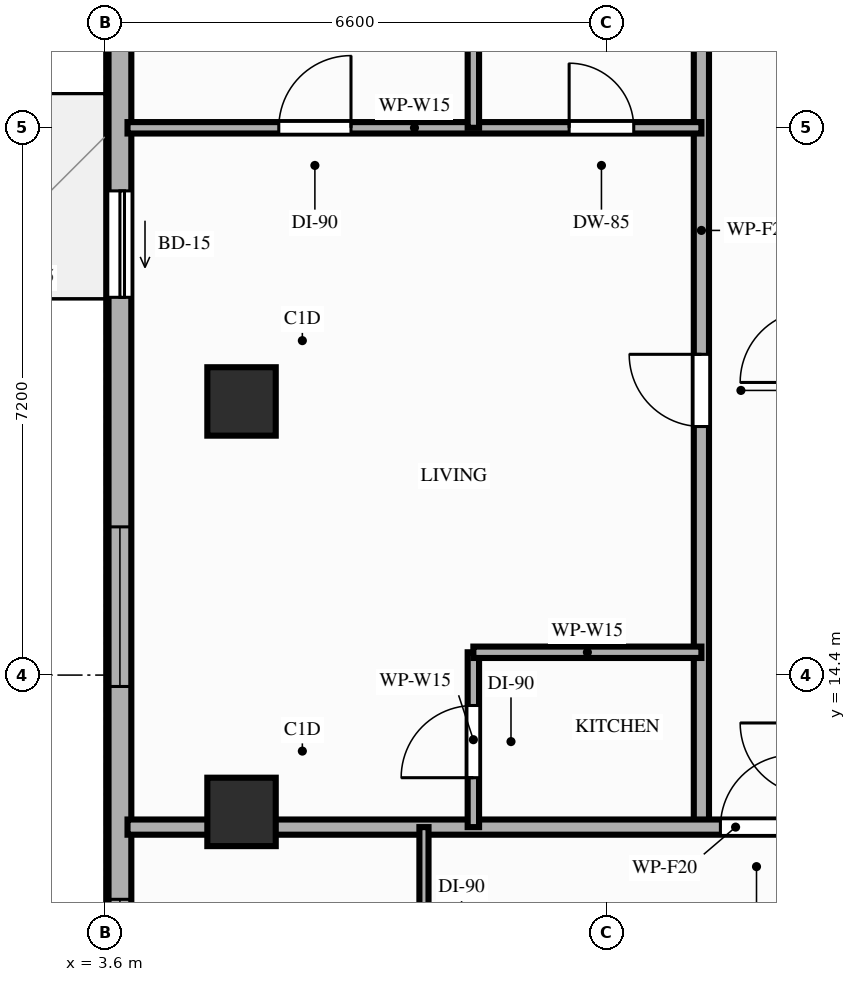
"""IFC4 building model, lengths in metres.
Left out: names, types, materials, properties, quantities, classifications, styles, units other than length and angle.
Written with IfcOpenShell. Run it as: python <this file> out.ifc"""

import sys

from ifc_helpers import new_model, si_unit, direction, frame, frame_2d, origin, origin_2d, place, context, subcontext, project, spatial, rectangle, extrude, element, fill, save


model = new_model("IFC4")
c1 = context("Model", 3, precision=1e-05, world=origin(), true_north=direction((0.0, 1.0)))
c2 = subcontext(c1, "Body", "Model", "MODEL_VIEW")
j1 = project(units=[si_unit("LENGTHUNIT", "METRE"), si_unit("PLANEANGLEUNIT", "RADIAN")], contexts=[c1])
p1 = place(None, origin())
s1 = spatial("IfcSite", under=j1, at=p1, CompositionType="ELEMENT")
p2 = place(p1, origin())
s2 = spatial("IfcBuilding", under=s1, at=p2, CompositionType="ELEMENT")
p3 = place(p2, frame((0.0, 0.0, 185.6)))
s3 = spatial("IfcBuildingStorey", under=s2, at=p3, CompositionType="ELEMENT", Elevation=185.6)
for number, where, z_axis, x_axis in (
    (1, (5.4, 12.6, 0.0), (0.0, 0.0, 1.0), (1.0, 0.0, 0.0)),
    (2, (5.4, 18.0, 0.0), (0.0, 0.0, 1.0), (1.0, 0.0, 0.0)),
):
    element("IfcColumn", number, at=place(p3, frame(where, z_axis=z_axis, x_axis=x_axis)), inside=s3, PredefinedType="COLUMN", context=c2, shape_type="SweptSolid", body=[
        extrude(rectangle(XDim=0.9, YDim=0.9, at=origin_2d()), origin(), (0.0, 0.0, 1.0), 3.2),
    ])
p4 = place(p3, frame((3.8, 42.1, 0.0), z_axis=(0.0, 0.0, 1.0), x_axis=(0.0, -1.0, 0.0)))
e3 = element("IfcWall", 3, at=p4, inside=s3, PredefinedType="STANDARD", context=c2, shape_type="SweptSolid", body=[
    extrude(rectangle(XDim=33.3, YDim=0.3, at=frame_2d((16.65, 0.0))), origin(), (0.0, 0.0, 1.0), 2.71),
])
p5 = place(p4, frame((21.33, 0.0, 0.0)))
e4 = element("IfcOpeningElement", 4, at=p5, cuts=e3, PredefinedType="OPENING", context=c2, shape_type="SweptSolid", body=[
    extrude(rectangle(XDim=1.4, YDim=2.1, at=frame_2d((0.7, 1.05))), frame((0.0, 0.16, 0.0), z_axis=(0.0, -1.0, 0.0), x_axis=(1.0, 0.0, 0.0)), (0.0, 0.0, 1.0), 0.32),
])
p6 = place(p4, frame((16.2, 0.0, 0.85)))
e5 = element("IfcOpeningElement", 5, at=p6, cuts=e3, PredefinedType="OPENING", context=c2, shape_type="SweptSolid", body=[
    extrude(rectangle(XDim=2.1, YDim=1.61, at=frame_2d((1.05, 0.805))), frame((0.0, 0.16, 0.0), z_axis=(0.0, -1.0, 0.0), x_axis=(1.0, 0.0, 0.0)), (0.0, 0.0, 1.0), 0.32),
])
p7 = place(p4, frame((30.65, 0.0, 0.85)))
e6 = element("IfcOpeningElement", 6, at=p7, cuts=e3, PredefinedType="OPENING", context=c2, shape_type="SweptSolid", body=[
    extrude(rectangle(XDim=2.1, YDim=1.61, at=frame_2d((1.05, 0.805))), frame((0.0, 0.16, 0.0), z_axis=(0.0, -1.0, 0.0), x_axis=(1.0, 0.0, 0.0)), (0.0, 0.0, 1.0), 0.32),
])
p8 = place(p4, frame((25.75, 0.0, 0.85)))
e7 = element("IfcOpeningElement", 7, at=p8, cuts=e3, PredefinedType="OPENING", context=c2, shape_type="SweptSolid", body=[
    extrude(rectangle(XDim=2.1, YDim=1.61, at=frame_2d((1.05, 0.805))), frame((0.0, 0.16, 0.0), z_axis=(0.0, -1.0, 0.0), x_axis=(1.0, 0.0, 0.0)), (0.0, 0.0, 1.0), 0.32),
])
p9 = place(p4, frame((9.75, 0.0, 0.85)))
e8 = element("IfcOpeningElement", 8, at=p9, cuts=e3, PredefinedType="OPENING", context=c2, shape_type="SweptSolid", body=[
    extrude(rectangle(XDim=2.1, YDim=1.61, at=frame_2d((1.05, 0.805))), frame((0.0, 0.16, 0.0), z_axis=(0.0, -1.0, 0.0), x_axis=(1.0, 0.0, 0.0)), (0.0, 0.0, 1.0), 0.32),
])
p10 = place(p4, frame((3.65, 0.0, 0.85)))
e9 = element("IfcOpeningElement", 9, at=p10, cuts=e3, PredefinedType="OPENING", context=c2, shape_type="SweptSolid", body=[
    extrude(rectangle(XDim=2.1, YDim=1.61, at=frame_2d((1.05, 0.805))), frame((0.0, 0.16, 0.0), z_axis=(0.0, -1.0, 0.0), x_axis=(1.0, 0.0, 0.0)), (0.0, 0.0, 1.0), 0.32),
])
p11 = place(p3, frame((11.45, 12.4, 0.0), z_axis=(0.0, 0.0, 1.0), x_axis=(0.0, 1.0, 0.0)))
e10 = element("IfcWall", 10, at=p11, inside=s3, PredefinedType="PARTITIONING", context=c2, shape_type="SweptSolid", body=[
    extrude(rectangle(XDim=15.7, YDim=0.2, at=frame_2d((7.85, 0.0))), origin(), (0.0, 0.0, 1.0), 2.45),
])
p12 = place(p11, frame((5.27, 0.0, 0.0)))
e11 = element("IfcOpeningElement", 11, at=p12, cuts=e10, PredefinedType="OPENING", context=c2, shape_type="SweptSolid", body=[
    extrude(rectangle(XDim=0.95, YDim=2.15, at=frame_2d((0.475, 1.075))), frame((0.0, 0.11, 0.0), z_axis=(0.0, -1.0, 0.0), x_axis=(1.0, 0.0, 0.0)), (0.0, 0.0, 1.0), 0.22),
])
p13 = place(p3, frame((3.9, 12.4, 0.0), z_axis=(0.0, 0.0, 1.0), x_axis=(1.0, 0.0, 0.0)))
e12 = element("IfcWall", 12, at=p13, inside=s3, PredefinedType="PARTITIONING", context=c2, shape_type="SweptSolid", body=[
    extrude(rectangle(XDim=16.0, YDim=0.2, at=frame_2d((8.0, 0.0))), origin(), (0.0, 0.0, 1.0), 2.45),
])
p14 = place(p13, frame((7.8, 0.0, 0.0)))
e13 = element("IfcOpeningElement", 13, at=p14, cuts=e12, PredefinedType="OPENING", context=c2, shape_type="SweptSolid", body=[
    extrude(rectangle(XDim=0.95, YDim=2.15, at=frame_2d((0.475, 1.075))), frame((0.0, 0.11, 0.0), z_axis=(0.0, -1.0, 0.0), x_axis=(1.0, 0.0, 0.0)), (0.0, 0.0, 1.0), 0.22),
])
p15 = place(p3, frame((7.8, 8.7, 0.0), z_axis=(0.0, 0.0, 1.0), x_axis=(0.0, 1.0, 0.0)))
e14 = element("IfcWall", 14, at=p15, inside=s3, PredefinedType="PARTITIONING", context=c2, shape_type="SweptSolid", body=[
    extrude(rectangle(XDim=3.7, YDim=0.12, at=frame_2d((1.85, 0.0))), origin(), (0.0, 0.0, 1.0), 2.45),
])
p16 = place(p15, frame((1.67, 0.0, 0.0)))
e15 = element("IfcOpeningElement", 15, at=p16, cuts=e14, PredefinedType="OPENING", context=c2, shape_type="SweptSolid", body=[
    extrude(rectangle(XDim=0.95, YDim=2.15, at=frame_2d((0.475, 1.075))), frame((0.0, 0.07, 0.0), z_axis=(0.0, -1.0, 0.0), x_axis=(1.0, 0.0, 0.0)), (0.0, 0.0, 1.0), 0.14),
])
p17 = place(p3, frame((3.9, 21.6, 0.0), z_axis=(0.0, 0.0, 1.0), x_axis=(1.0, 0.0, 0.0)))
e16 = element("IfcWall", 16, at=p17, inside=s3, PredefinedType="PARTITIONING", context=c2, shape_type="SweptSolid", body=[
    extrude(rectangle(XDim=7.55, YDim=0.15, at=frame_2d((3.775, 0.0))), origin(), (0.0, 0.0, 1.0), 2.45),
])
p18 = place(p17, frame((1.99, 0.0, 0.0)))
e17 = element("IfcOpeningElement", 17, at=p18, cuts=e16, PredefinedType="OPENING", context=c2, shape_type="SweptSolid", body=[
    extrude(rectangle(XDim=0.95, YDim=2.15, at=frame_2d((0.475, 1.075))), frame((0.0, 0.085, 0.0), z_axis=(0.0, -1.0, 0.0), x_axis=(1.0, 0.0, 0.0)), (0.0, 0.0, 1.0), 0.17),
])
p19 = place(p17, frame((5.81, 0.0, 0.0)))
e18 = element("IfcOpeningElement", 18, at=p19, cuts=e16, PredefinedType="OPENING", context=c2, shape_type="SweptSolid", body=[
    extrude(rectangle(XDim=0.85, YDim=2.1, at=frame_2d((0.425, 1.05))), frame((0.0, 0.085, 0.0), z_axis=(0.0, -1.0, 0.0), x_axis=(1.0, 0.0, 0.0)), (0.0, 0.0, 1.0), 0.17),
])
p20 = place(p3, frame((8.45, 21.6, 0.0), z_axis=(0.0, 0.0, 1.0), x_axis=(0.0, 1.0, 0.0)))
e19 = element("IfcWall", 19, at=p20, inside=s3, PredefinedType="PARTITIONING", context=c2, shape_type="SweptSolid", body=[
    extrude(rectangle(XDim=6.5, YDim=0.15, at=frame_2d((3.25, 0.0))), origin(), (0.0, 0.0, 1.0), 2.45),
])
p21 = place(p3, frame((8.45, 12.4, 0.0), z_axis=(0.0, 0.0, 1.0), x_axis=(0.0, 1.0, 0.0)))
e20 = element("IfcWall", 20, at=p21, inside=s3, PredefinedType="PARTITIONING", context=c2, shape_type="SweptSolid", body=[
    extrude(rectangle(XDim=2.3, YDim=0.15, at=frame_2d((1.15, 0.0))), origin(), (0.0, 0.0, 1.0), 2.45),
])
p22 = place(p21, frame((0.65, 0.0, 0.0)))
e21 = element("IfcOpeningElement", 21, at=p22, cuts=e20, PredefinedType="OPENING", context=c2, shape_type="SweptSolid", body=[
    extrude(rectangle(XDim=0.95, YDim=2.15, at=frame_2d((0.475, 1.075))), frame((0.0, 0.085, 0.0), z_axis=(0.0, -1.0, 0.0), x_axis=(1.0, 0.0, 0.0)), (0.0, 0.0, 1.0), 0.17),
])
p23 = place(p3, frame((8.45, 14.7, 0.0), z_axis=(0.0, 0.0, 1.0), x_axis=(1.0, 0.0, 0.0)))
e22 = element("IfcWall", 22, at=p23, inside=s3, PredefinedType="PARTITIONING", context=c2, shape_type="SweptSolid", body=[
    extrude(rectangle(XDim=3.0, YDim=0.15, at=frame_2d((1.5, 0.0))), origin(), (0.0, 0.0, 1.0), 3.02),
])
p24 = place(p5, origin())
e23 = element("IfcDoor", 23, at=p24, inside=s3, OperationType="SLIDING_TO_RIGHT", PredefinedType="DOOR", context=c2, shape_type="SweptSolid", body=[
    extrude(rectangle(XDim=1.4, YDim=2.1, at=frame_2d((0.7, 1.05))), frame((0.0, 0.025, 0.0), z_axis=(0.0, -1.0, 0.0), x_axis=(1.0, 0.0, 0.0)), (0.0, 0.0, 1.0), 0.05),
])
fill(e4, e23)
p25 = place(p7, origin())
e24 = element("IfcWindow", 24, at=p25, inside=s3, PartitioningType="SINGLE_PANEL", PredefinedType="WINDOW", context=c2, shape_type="SweptSolid", body=[
    extrude(rectangle(XDim=2.1, YDim=1.61, at=frame_2d((1.05, 0.805))), frame((0.0, 0.03, 0.0), z_axis=(0.0, -1.0, 0.0), x_axis=(1.0, 0.0, 0.0)), (0.0, 0.0, 1.0), 0.06),
])
fill(e6, e24)
p26 = place(p8, origin())
e25 = element("IfcWindow", 25, at=p26, inside=s3, PartitioningType="SINGLE_PANEL", PredefinedType="WINDOW", context=c2, shape_type="SweptSolid", body=[
    extrude(rectangle(XDim=2.1, YDim=1.61, at=frame_2d((1.05, 0.805))), frame((0.0, 0.03, 0.0), z_axis=(0.0, -1.0, 0.0), x_axis=(1.0, 0.0, 0.0)), (0.0, 0.0, 1.0), 0.06),
])
fill(e7, e25)
p27 = place(p14, origin())
e26 = element("IfcDoor", 26, at=p27, inside=s3, OperationType="SINGLE_SWING_RIGHT", PredefinedType="DOOR", context=c2, shape_type="SweptSolid", body=[
    extrude(rectangle(XDim=0.95, YDim=2.15, at=frame_2d((0.475, 1.075))), frame((0.0, 0.025, 0.0), z_axis=(0.0, -1.0, 0.0), x_axis=(1.0, 0.0, 0.0)), (0.0, 0.0, 1.0), 0.05),
])
fill(e13, e26)
p28 = place(p12, origin())
e27 = element("IfcDoor", 27, at=p28, inside=s3, OperationType="SINGLE_SWING_RIGHT", PredefinedType="DOOR", context=c2, shape_type="SweptSolid", body=[
    extrude(rectangle(XDim=0.95, YDim=2.15, at=frame_2d((0.475, 1.075))), frame((0.0, 0.025, 0.0), z_axis=(0.0, -1.0, 0.0), x_axis=(1.0, 0.0, 0.0)), (0.0, 0.0, 1.0), 0.05),
])
fill(e11, e27)
p29 = place(p22, origin())
e28 = element("IfcDoor", 28, at=p29, inside=s3, OperationType="SINGLE_SWING_LEFT", PredefinedType="DOOR", context=c2, shape_type="SweptSolid", body=[
    extrude(rectangle(XDim=0.95, YDim=2.15, at=frame_2d((0.475, 1.075))), frame((0.0, 0.025, 0.0), z_axis=(0.0, -1.0, 0.0), x_axis=(1.0, 0.0, 0.0)), (0.0, 0.0, 1.0), 0.05),
])
fill(e21, e28)
p30 = place(p18, origin())
e29 = element("IfcDoor", 29, at=p30, inside=s3, OperationType="SINGLE_SWING_RIGHT", PredefinedType="DOOR", context=c2, shape_type="SweptSolid", body=[
    extrude(rectangle(XDim=0.95, YDim=2.15, at=frame_2d((0.475, 1.075))), frame((0.0, 0.025, 0.0), z_axis=(0.0, -1.0, 0.0), x_axis=(1.0, 0.0, 0.0)), (0.0, 0.0, 1.0), 0.05),
])
fill(e17, e29)
p31 = place(p19, origin())
e30 = element("IfcDoor", 30, at=p31, inside=s3, OperationType="SINGLE_SWING_LEFT", PredefinedType="DOOR", context=c2, shape_type="SweptSolid", body=[
    extrude(rectangle(XDim=0.85, YDim=2.1, at=frame_2d((0.425, 1.05))), frame((0.0, 0.025, 0.0), z_axis=(0.0, -1.0, 0.0), x_axis=(1.0, 0.0, 0.0)), (0.0, 0.0, 1.0), 0.05),
])
fill(e18, e30)
save(model, sys.argv[1])
